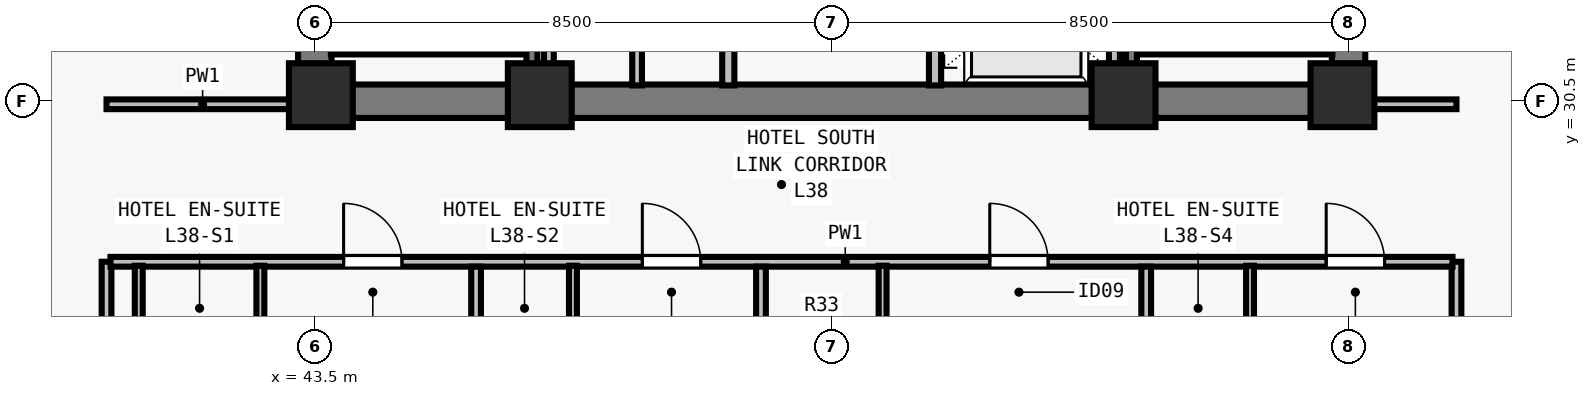
"""IFC4 building model, lengths in metres.
Left out: names, types, materials, properties, quantities, classifications, styles, units other than length and angle.
Written with IfcOpenShell. Run it as: python <this file> out.ifc"""

import sys

from ifc_helpers import new_model, si_unit, direction, frame, frame_2d, origin, origin_2d, place, context, subcontext, project, spatial, rectangle, extrude, element, fill, save


model = new_model("IFC4")
c1 = context("Model", 3, precision=1e-05, world=origin(), true_north=direction((0.0, 1.0)))
c2 = subcontext(c1, "Body", "Model", "MODEL_VIEW")
j1 = project(units=[si_unit("LENGTHUNIT", "METRE"), si_unit("PLANEANGLEUNIT", "RADIAN")], contexts=[c1])
p1 = place(None, origin())
s1 = spatial("IfcSite", under=j1, at=p1, CompositionType="ELEMENT")
p2 = place(p1, origin())
s2 = spatial("IfcBuilding", under=s1, at=p2, CompositionType="ELEMENT")
p3 = place(p2, frame((0.0, 0.0, 141.0)))
s3 = spatial("IfcBuildingStorey", under=s2, at=p3, CompositionType="ELEMENT", Elevation=141.0)
for number, where, z_axis, x_axis in (
    (1, (43.6, 30.6, 0.0), (0.0, 0.0, 1.0), (1.0, 0.0, 0.0)),
    (2, (47.2, 30.6, 0.0), (0.0, 0.0, 1.0), (1.0, 0.0, 0.0)),
    (3, (56.8, 30.6, 0.0), (0.0, 0.0, 1.0), (1.0, 0.0, 0.0)),
    (4, (60.4, 30.6, 0.0), (0.0, 0.0, 1.0), (1.0, 0.0, 0.0)),
):
    element("IfcColumn", number, at=place(p3, frame(where, z_axis=z_axis, x_axis=x_axis)), inside=s3, PredefinedType="COLUMN", context=c2, shape_type="SweptSolid", body=[
        extrude(rectangle(XDim=1.05, YDim=1.05, at=origin_2d()), origin(), (0.0, 0.0, 1.0), 3.5),
    ])
p4 = place(p3, frame((43.225, 30.5, 0.0), z_axis=(0.0, 0.0, 1.0), x_axis=(1.0, 0.0, 0.0)))
e5 = element("IfcWall", 5, at=p4, inside=s3, PredefinedType="SHEAR", context=c2, shape_type="SweptSolid", body=[
    extrude(rectangle(XDim=17.55, YDim=0.55, at=frame_2d((8.775, 0.0))), origin(), (0.0, 0.0, 1.0), 3.28),
])
for number, where, z_axis, x_axis in (
    (6, (43.5, 30.765, 0.0), (0.0, 0.0, 1.0), (0.0, 1.0, 0.0)),
    (7, (60.5, 30.765, 0.0), (0.0, 0.0, 1.0), (0.0, 1.0, 0.0)),
):
    element("IfcWall", number, at=place(p3, frame(where, z_axis=z_axis, x_axis=x_axis)), inside=s3, PredefinedType="SHEAR", context=c2, shape_type="SweptSolid", body=[
        extrude(rectangle(XDim=7.985, YDim=0.55, at=frame_2d((3.993, 0.0))), origin(), (0.0, 0.0, 1.0), 3.28),
    ])
p5 = place(p3, frame((50.3, 30.76, 0.0), z_axis=(0.0, 0.0, 1.0), x_axis=(0.0, 1.0, 0.0)))
e8 = element("IfcWall", 8, at=p5, inside=s3, PredefinedType="SOLIDWALL", context=c2, shape_type="SweptSolid", body=[
    extrude(rectangle(XDim=7.855, YDim=0.2, at=frame_2d((3.927, 0.0))), origin(), (0.0, 0.0, 1.0), 3.28),
])
p6 = place(p5, frame((2.09, 0.0, 0.0)))
e9 = element("IfcOpeningElement", 9, at=p6, cuts=e8, PredefinedType="OPENING", context=c2, shape_type="SweptSolid", body=[
    extrude(rectangle(XDim=0.95, YDim=2.12, at=frame_2d((0.475, 1.06))), frame((0.0, 0.11, 0.0), z_axis=(0.0, -1.0, 0.0), x_axis=(1.0, 0.0, 0.0)), (0.0, 0.0, 1.0), 0.22),
])
p7 = place(p3, frame((53.7, 30.76, 0.0), z_axis=(0.0, 0.0, 1.0), x_axis=(0.0, 1.0, 0.0)))
e10 = element("IfcWall", 10, at=p7, inside=s3, PredefinedType="SOLIDWALL", context=c2, shape_type="SweptSolid", body=[
    extrude(rectangle(XDim=7.855, YDim=0.2, at=frame_2d((3.927, 0.0))), origin(), (0.0, 0.0, 1.0), 3.28),
])
p8 = place(p7, frame((0.79, 0.0, 0.0)))
e11 = element("IfcOpeningElement", 11, at=p8, cuts=e10, PredefinedType="OPENING", context=c2, shape_type="SweptSolid", body=[
    extrude(rectangle(XDim=1.1, YDim=2.2, at=frame_2d((0.55, 1.1))), frame((0.0, 0.11, 0.0), z_axis=(0.0, -1.0, 0.0), x_axis=(1.0, 0.0, 0.0)), (0.0, 0.0, 1.0), 0.22),
])
p9 = place(p7, frame((3.49, 0.0, 0.0)))
e12 = element("IfcOpeningElement", 12, at=p9, cuts=e10, PredefinedType="OPENING", context=c2, shape_type="SweptSolid", body=[
    extrude(rectangle(XDim=1.1, YDim=2.2, at=frame_2d((0.55, 1.1))), frame((0.0, 0.11, 0.0), z_axis=(0.0, -1.0, 0.0), x_axis=(1.0, 0.0, 0.0)), (0.0, 0.0, 1.0), 0.22),
])
p10 = place(p7, frame((6.19, 0.0, 0.0)))
e13 = element("IfcOpeningElement", 13, at=p10, cuts=e10, PredefinedType="OPENING", context=c2, shape_type="SweptSolid", body=[
    extrude(rectangle(XDim=1.1, YDim=2.2, at=frame_2d((0.55, 1.1))), frame((0.0, 0.11, 0.0), z_axis=(0.0, -1.0, 0.0), x_axis=(1.0, 0.0, 0.0)), (0.0, 0.0, 1.0), 0.22),
])
p11 = place(p3, frame((47.35, 30.76, 0.0), z_axis=(0.0, 0.0, 1.0), x_axis=(0.0, 1.0, 0.0)))
e14 = element("IfcWall", 14, at=p11, inside=s3, PredefinedType="PARTITIONING", context=c2, shape_type="SweptSolid", body=[
    extrude(rectangle(XDim=7.855, YDim=0.16, at=frame_2d((3.927, 0.0))), origin(), (0.0, 0.0, 1.0), 3.28),
])
p12 = place(p3, frame((48.8, 30.76, 0.0), z_axis=(0.0, 0.0, 1.0), x_axis=(0.0, 1.0, 0.0)))
e15 = element("IfcWall", 15, at=p12, inside=s3, PredefinedType="PARTITIONING", context=c2, shape_type="SweptSolid", body=[
    extrude(rectangle(XDim=7.855, YDim=0.16, at=frame_2d((3.927, 0.0))), origin(), (0.0, 0.0, 1.0), 3.28),
])
p13 = place(p12, frame((3.49, 0.0, 0.0)))
e16 = element("IfcOpeningElement", 16, at=p13, cuts=e15, PredefinedType="OPENING", context=c2, shape_type="SweptSolid", body=[
    extrude(rectangle(XDim=0.85, YDim=2.12, at=frame_2d((0.425, 1.06))), frame((0.0, 0.09, 0.0), z_axis=(0.0, -1.0, 0.0), x_axis=(1.0, 0.0, 0.0)), (0.0, 0.0, 1.0), 0.18),
])
p14 = place(p3, frame((56.65, 30.76, 0.0), z_axis=(0.0, 0.0, 1.0), x_axis=(0.0, 1.0, 0.0)))
e17 = element("IfcWall", 17, at=p14, inside=s3, PredefinedType="SOLIDWALL", context=c2, shape_type="SweptSolid", body=[
    extrude(rectangle(XDim=7.855, YDim=0.18, at=frame_2d((3.927, 0.0))), origin(), (0.0, 0.0, 1.0), 3.28),
])
p15 = place(p3, frame((40.075, 15.415, 0.0), z_axis=(0.0, 0.0, 1.0), x_axis=(0.0, 1.0, 0.0)))
e18 = element("IfcWall", 18, at=p15, inside=s3, PredefinedType="PARTITIONING", context=c2, shape_type="SweptSolid", body=[
    extrude(rectangle(XDim=12.445, YDim=0.16, at=frame_2d((6.223, 0.0))), origin(), (0.0, 0.0, 1.0), 2.555),
])
p16 = place(p3, frame((40.075, 30.45, 0.0), z_axis=(0.0, 0.0, 1.0), x_axis=(1.0, 0.0, 0.0)))
e19 = element("IfcWall", 19, at=p16, inside=s3, PredefinedType="PARTITIONING", context=c2, shape_type="SweptSolid", body=[
    extrude(rectangle(XDim=3.16, YDim=0.16, at=frame_2d((1.58, 0.0))), origin(), (0.0, 0.0, 1.0), 3.28),
])
p17 = place(p3, frame((62.275, 15.325, 0.0), z_axis=(0.0, 0.0, 1.0), x_axis=(0.0, 1.0, 0.0)))
e20 = element("IfcWall", 20, at=p17, inside=s3, PredefinedType="PARTITIONING", context=c2, shape_type="SweptSolid", body=[
    extrude(rectangle(XDim=12.535, YDim=0.16, at=frame_2d((6.268, 0.0))), origin(), (0.0, 0.0, 1.0), 3.28),
])
p18 = place(p3, frame((60.765, 30.45, 0.0), z_axis=(0.0, 0.0, 1.0), x_axis=(1.0, 0.0, 0.0)))
e21 = element("IfcWall", 21, at=p18, inside=s3, PredefinedType="PARTITIONING", context=c2, shape_type="SweptSolid", body=[
    extrude(rectangle(XDim=1.51, YDim=0.16, at=frame_2d((0.755, 0.0))), origin(), (0.0, 0.0, 1.0), 3.28),
])
p19 = place(p3, frame((40.14, 27.86, 0.0), z_axis=(0.0, 0.0, 1.0), x_axis=(1.0, 0.0, 0.0)))
e22 = element("IfcWall", 22, at=p19, inside=s3, PredefinedType="PARTITIONING", context=c2, shape_type="SweptSolid", body=[
    extrude(rectangle(XDim=22.07, YDim=0.16, at=frame_2d((11.035, 0.0))), origin(), (0.0, 0.0, 1.0), 3.28),
])
p20 = place(p19, frame((3.834, 0.0, 0.0)))
e23 = element("IfcOpeningElement", 23, at=p20, cuts=e22, PredefinedType="OPENING", context=c2, shape_type="SweptSolid", body=[
    extrude(rectangle(XDim=0.96, YDim=2.15, at=frame_2d((0.48, 1.075))), frame((0.0, 0.09, 0.0), z_axis=(0.0, -1.0, 0.0), x_axis=(1.0, 0.0, 0.0)), (0.0, 0.0, 1.0), 0.18),
])
p21 = place(p19, frame((8.746, 0.0, 0.0)))
e24 = element("IfcOpeningElement", 24, at=p21, cuts=e22, PredefinedType="OPENING", context=c2, shape_type="SweptSolid", body=[
    extrude(rectangle(XDim=0.96, YDim=2.15, at=frame_2d((0.48, 1.075))), frame((0.0, 0.09, 0.0), z_axis=(0.0, -1.0, 0.0), x_axis=(1.0, 0.0, 0.0)), (0.0, 0.0, 1.0), 0.18),
])
p22 = place(p19, frame((14.46, 0.0, 0.0)))
e25 = element("IfcOpeningElement", 25, at=p22, cuts=e22, PredefinedType="OPENING", context=c2, shape_type="SweptSolid", body=[
    extrude(rectangle(XDim=0.96, YDim=2.15, at=frame_2d((0.48, 1.075))), frame((0.0, 0.09, 0.0), z_axis=(0.0, -1.0, 0.0), x_axis=(1.0, 0.0, 0.0)), (0.0, 0.0, 1.0), 0.18),
])
p23 = place(p19, frame((19.993, 0.0, 0.0)))
e26 = element("IfcOpeningElement", 26, at=p23, cuts=e22, PredefinedType="OPENING", context=c2, shape_type="SweptSolid", body=[
    extrude(rectangle(XDim=0.96, YDim=2.15, at=frame_2d((0.48, 1.075))), frame((0.0, 0.09, 0.0), z_axis=(0.0, -1.0, 0.0), x_axis=(1.0, 0.0, 0.0)), (0.0, 0.0, 1.0), 0.18),
])
p24 = place(p3, frame((40.605, 25.48, 0.0), z_axis=(0.0, 0.0, 1.0), x_axis=(0.0, 1.0, 0.0)))
e27 = element("IfcWall", 27, at=p24, inside=s3, PredefinedType="PLUMBINGWALL", context=c2, shape_type="SweptSolid", body=[
    extrude(rectangle(XDim=2.315, YDim=0.13, at=frame_2d((1.157, 0.0))), origin(), (0.0, 0.0, 1.0), 2.555),
])
p25 = place(p3, frame((42.605, 25.48, 0.0), z_axis=(0.0, 0.0, 1.0), x_axis=(0.0, 1.0, 0.0)))
e28 = element("IfcWall", 28, at=p25, inside=s3, PredefinedType="PLUMBINGWALL", context=c2, shape_type="SweptSolid", body=[
    extrude(rectangle(XDim=2.315, YDim=0.13, at=frame_2d((1.157, 0.0))), origin(), (0.0, 0.0, 1.0), 3.28),
])
p26 = place(p3, frame((46.153, 15.325, 0.0), z_axis=(0.0, 0.0, 1.0), x_axis=(0.0, 1.0, 0.0)))
e29 = element("IfcWall", 29, at=p26, inside=s3, PredefinedType="PARTITIONING", context=c2, shape_type="SweptSolid", body=[
    extrude(rectangle(XDim=12.455, YDim=0.16, at=frame_2d((6.228, 0.0))), origin(), (0.0, 0.0, 1.0), 3.28),
])
p27 = place(p3, frame((47.745, 25.48, 0.0), z_axis=(0.0, 0.0, 1.0), x_axis=(0.0, 1.0, 0.0)))
e30 = element("IfcWall", 30, at=p27, inside=s3, PredefinedType="PLUMBINGWALL", context=c2, shape_type="SweptSolid", body=[
    extrude(rectangle(XDim=2.315, YDim=0.13, at=frame_2d((1.157, 0.0))), origin(), (0.0, 0.0, 1.0), 3.28),
])
p28 = place(p3, frame((50.837, 15.325, 0.0), z_axis=(0.0, 0.0, 1.0), x_axis=(0.0, 1.0, 0.0)))
e31 = element("IfcWall", 31, at=p28, inside=s3, PredefinedType="PARTITIONING", context=c2, shape_type="SweptSolid", body=[
    extrude(rectangle(XDim=12.455, YDim=0.16, at=frame_2d((6.228, 0.0))), origin(), (0.0, 0.0, 1.0), 2.896),
])
p29 = place(p3, frame((52.837, 25.48, 0.0), z_axis=(0.0, 0.0, 1.0), x_axis=(0.0, 1.0, 0.0)))
e32 = element("IfcWall", 32, at=p29, inside=s3, PredefinedType="PLUMBINGWALL", context=c2, shape_type="SweptSolid", body=[
    extrude(rectangle(XDim=2.315, YDim=0.13, at=frame_2d((1.157, 0.0))), origin(), (0.0, 0.0, 1.0), 3.28),
])
p30 = place(p3, frame((57.173, 15.325, 0.0), z_axis=(0.0, 0.0, 1.0), x_axis=(0.0, 1.0, 0.0)))
e33 = element("IfcWall", 33, at=p30, inside=s3, PredefinedType="PARTITIONING", context=c2, shape_type="SweptSolid", body=[
    extrude(rectangle(XDim=12.455, YDim=0.16, at=frame_2d((6.228, 0.0))), origin(), (0.0, 0.0, 1.0), 3.28),
])
p31 = place(p3, frame((58.88, 25.48, 0.0), z_axis=(0.0, 0.0, 1.0), x_axis=(0.0, 1.0, 0.0)))
e34 = element("IfcWall", 34, at=p31, inside=s3, PredefinedType="PLUMBINGWALL", context=c2, shape_type="SweptSolid", body=[
    extrude(rectangle(XDim=2.315, YDim=0.13, at=frame_2d((1.157, 0.0))), origin(), (0.0, 0.0, 1.0), 3.28),
])
p32 = place(p3, frame((43.765, 31.36, 0.0), z_axis=(0.0, 0.0, 1.0), x_axis=(1.0, 0.0, 0.0)))
e35 = element("IfcWall", 35, at=p32, inside=s3, PredefinedType="SOLIDWALL", context=c2, shape_type="SweptSolid", body=[
    extrude(rectangle(XDim=3.23, YDim=0.18, at=frame_2d((1.615, 0.0))), origin(), (0.0, 0.0, 1.0), 3.28),
])
p33 = place(p3, frame((47.07, 38.78, 0.0), z_axis=(0.0, 0.0, 1.0), x_axis=(0.0, -1.0, 0.0)))
e36 = element("IfcWall", 36, at=p33, inside=s3, PredefinedType="SOLIDWALL", context=c2, shape_type="SweptSolid", body=[
    extrude(rectangle(XDim=8.017, YDim=0.18, at=frame_2d((4.009, 0.0))), origin(), (0.0, 0.0, 1.0), 3.28),
])
p34 = place(p3, frame((57.005, 31.36, 0.0), z_axis=(0.0, 0.0, 1.0), x_axis=(1.0, 0.0, 0.0)))
e37 = element("IfcWall", 37, at=p34, inside=s3, PredefinedType="SOLIDWALL", context=c2, shape_type="SweptSolid", body=[
    extrude(rectangle(XDim=3.23, YDim=0.18, at=frame_2d((1.615, 0.0))), origin(), (0.0, 0.0, 1.0), 3.28),
])
p35 = place(p3, frame((56.93, 38.78, 0.0), z_axis=(0.0, 0.0, 1.0), x_axis=(0.0, -1.0, 0.0)))
e38 = element("IfcWall", 38, at=p35, inside=s3, PredefinedType="SOLIDWALL", context=c2, shape_type="SweptSolid", body=[
    extrude(rectangle(XDim=8.017, YDim=0.18, at=frame_2d((4.009, 0.0))), origin(), (0.0, 0.0, 1.0), 3.28),
])
p36 = place(p20, origin())
e39 = element("IfcDoor", 39, at=p36, inside=s3, OperationType="SINGLE_SWING_LEFT", PredefinedType="DOOR", context=c2, shape_type="SweptSolid", body=[
    extrude(rectangle(XDim=0.96, YDim=2.15, at=frame_2d((0.48, 1.075))), frame((0.0, 0.025, 0.0), z_axis=(0.0, -1.0, 0.0), x_axis=(1.0, 0.0, 0.0)), (0.0, 0.0, 1.0), 0.05),
])
fill(e23, e39)
p37 = place(p21, origin())
e40 = element("IfcDoor", 40, at=p37, inside=s3, OperationType="SINGLE_SWING_LEFT", PredefinedType="DOOR", context=c2, shape_type="SweptSolid", body=[
    extrude(rectangle(XDim=0.96, YDim=2.15, at=frame_2d((0.48, 1.075))), frame((0.0, 0.025, 0.0), z_axis=(0.0, -1.0, 0.0), x_axis=(1.0, 0.0, 0.0)), (0.0, 0.0, 1.0), 0.05),
])
fill(e24, e40)
p38 = place(p22, origin())
e41 = element("IfcDoor", 41, at=p38, inside=s3, OperationType="SINGLE_SWING_LEFT", PredefinedType="DOOR", context=c2, shape_type="SweptSolid", body=[
    extrude(rectangle(XDim=0.96, YDim=2.15, at=frame_2d((0.48, 1.075))), frame((0.0, 0.025, 0.0), z_axis=(0.0, -1.0, 0.0), x_axis=(1.0, 0.0, 0.0)), (0.0, 0.0, 1.0), 0.05),
])
fill(e25, e41)
p39 = place(p23, origin())
e42 = element("IfcDoor", 42, at=p39, inside=s3, OperationType="SINGLE_SWING_LEFT", PredefinedType="DOOR", context=c2, shape_type="SweptSolid", body=[
    extrude(rectangle(XDim=0.96, YDim=2.15, at=frame_2d((0.48, 1.075))), frame((0.0, 0.025, 0.0), z_axis=(0.0, -1.0, 0.0), x_axis=(1.0, 0.0, 0.0)), (0.0, 0.0, 1.0), 0.05),
])
fill(e26, e42)
save(model, sys.argv[1])
